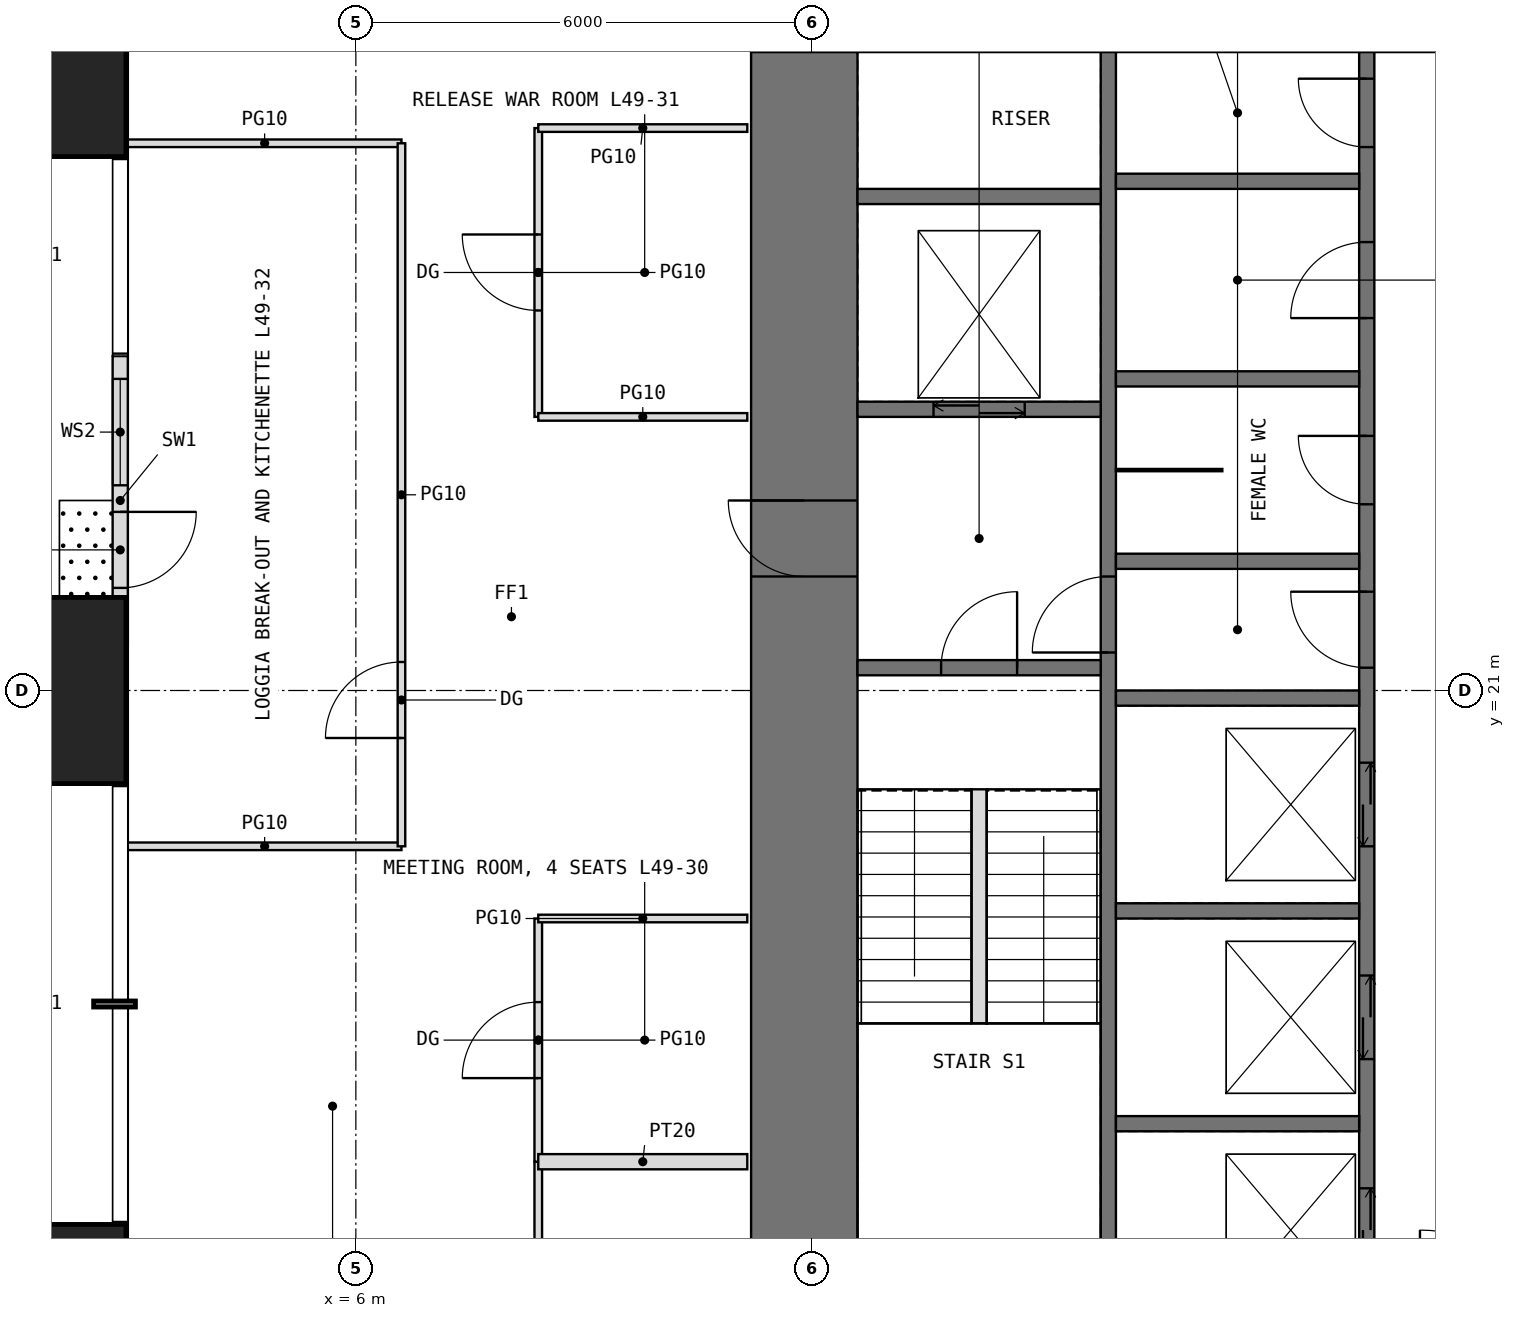
"""IFC4 building model, lengths in metres.
Left out: names, types, materials, properties, quantities, classifications, styles, units other than length and angle.
Written with IfcOpenShell. Run it as: python <this file> out.ifc"""

import sys

from ifc_helpers import new_model, si_unit, direction, frame, frame_2d, origin, origin_2d, place, context, subcontext, project, spatial, rectangle, extrude, element, fill, save


model = new_model("IFC4")
c1 = context("Model", 3, precision=1e-05, world=origin(), true_north=direction((0.0, 1.0)))
c2 = subcontext(c1, "Body", "Model", "MODEL_VIEW")
j1 = project(units=[si_unit("LENGTHUNIT", "METRE"), si_unit("PLANEANGLEUNIT", "RADIAN")], contexts=[c1])
p1 = place(None, origin())
s1 = spatial("IfcSite", under=j1, at=p1, CompositionType="ELEMENT")
p2 = place(p1, origin())
s2 = spatial("IfcBuilding", under=s1, at=p2, CompositionType="ELEMENT")
p3 = place(p2, frame((0.0, 0.0, 206.5)))
s3 = spatial("IfcBuildingStorey", under=s2, at=p3, CompositionType="ELEMENT", Elevation=206.5)
for number, where, z_axis, x_axis in (
    (1, (1.75, 12.75, 0.0), (0.0, 0.0, 1.0), (1.0, 0.0, 0.0)),
    (2, (1.75, 21.0, 0.0), (0.0, 0.0, 1.0), (1.0, 0.0, 0.0)),
    (3, (1.75, 29.25, 0.0), (0.0, 0.0, 1.0), (1.0, 0.0, 0.0)),
):
    element("IfcColumn", number, at=place(p3, frame(where, z_axis=z_axis, x_axis=x_axis)), inside=s3, PredefinedType="COLUMN", context=c2, shape_type="SweptSolid", body=[
        extrude(rectangle(XDim=2.45, YDim=2.45, at=origin_2d()), origin(), (0.0, 0.0, 1.0), 4.0),
    ])
p4 = place(p3, frame((2.9, 25.4, 0.0), z_axis=(0.0, 0.0, 1.0), x_axis=(0.0, -1.0, 0.0)))
e4 = element("IfcWall", 4, at=p4, inside=s3, PredefinedType="USERDEFINED", context=c2, shape_type="SweptSolid", body=[
    extrude(rectangle(XDim=3.8, YDim=0.2, at=frame_2d((1.9, 0.0))), origin(), (0.0, 0.0, 1.0), 3.75),
])
p5 = place(p4, frame((2.05, 0.0, 0.0)))
e5 = element("IfcOpeningElement", 5, at=p5, cuts=e4, PredefinedType="OPENING", context=c2, shape_type="SweptSolid", body=[
    extrude(rectangle(XDim=1.0, YDim=2.4, at=frame_2d((0.5, 1.2))), frame((0.0, 0.11, 0.0), z_axis=(0.0, -1.0, 0.0), x_axis=(1.0, 0.0, 0.0)), (0.0, 0.0, 1.0), 0.22),
])
p6 = place(p4, frame((0.3, 0.0, 0.3)))
e6 = element("IfcOpeningElement", 6, at=p6, cuts=e4, PredefinedType="OPENING", context=c2, shape_type="SweptSolid", body=[
    extrude(rectangle(XDim=1.4, YDim=2.7, at=frame_2d((0.7, 1.35))), frame((0.0, 0.11, 0.0), z_axis=(0.0, -1.0, 0.0), x_axis=(1.0, 0.0, 0.0)), (0.0, 0.0, 1.0), 0.22),
])
p7 = place(p3, frame((11.9, 12.6, -0.05), z_axis=(0.0, 0.0, 1.0), x_axis=(0.0, 1.0, 0.0)))
e7 = element("IfcWall", 7, at=p7, inside=s3, PredefinedType="SHEAR", context=c2, shape_type="SweptSolid", body=[
    extrude(rectangle(XDim=16.8, YDim=1.4, at=frame_2d((8.4, 0.0))), origin(), (0.0, 0.0, 1.0), 4.0),
])
p8 = place(p7, frame((9.9, 0.0, 0.05)))
e8 = element("IfcOpeningElement", 8, at=p8, cuts=e7, PredefinedType="OPENING", context=c2, shape_type="SweptSolid", body=[
    extrude(rectangle(XDim=1.0, YDim=2.2, at=frame_2d((0.5, 1.1))), frame((0.0, 0.71, 0.0), z_axis=(0.0, -1.0, 0.0), x_axis=(1.0, 0.0, 0.0)), (0.0, 0.0, 1.0), 1.42),
])
p9 = place(p3, frame((15.9, 12.6, -0.05), z_axis=(0.0, 0.0, 1.0), x_axis=(0.0, 1.0, 0.0)))
e9 = element("IfcWall", 9, at=p9, inside=s3, PredefinedType="SHEAR", context=c2, shape_type="SweptSolid", body=[
    extrude(rectangle(XDim=16.8, YDim=0.2, at=frame_2d((8.4, 0.0))), origin(), (0.0, 0.0, 1.0), 4.0),
])
p10 = place(p9, frame((8.9, 0.0, 0.05)))
e10 = element("IfcOpeningElement", 10, at=p10, cuts=e9, PredefinedType="OPENING", context=c2, shape_type="SweptSolid", body=[
    extrude(rectangle(XDim=1.0, YDim=2.2, at=frame_2d((0.5, 1.1))), frame((0.0, 0.11, 0.0), z_axis=(0.0, -1.0, 0.0), x_axis=(1.0, 0.0, 0.0)), (0.0, 0.0, 1.0), 0.22),
])
p11 = place(p3, frame((19.3, 12.6, -0.05), z_axis=(0.0, 0.0, 1.0), x_axis=(0.0, 1.0, 0.0)))
e11 = element("IfcWall", 11, at=p11, inside=s3, PredefinedType="SHEAR", context=c2, shape_type="SweptSolid", body=[
    extrude(rectangle(XDim=16.8, YDim=0.2, at=frame_2d((8.4, 0.0))), origin(), (0.0, 0.0, 1.0), 4.0),
])
p12 = place(p11, frame((8.7, 0.0, 0.05)))
e12 = element("IfcOpeningElement", 12, at=p12, cuts=e11, PredefinedType="OPENING", context=c2, shape_type="SweptSolid", body=[
    extrude(rectangle(XDim=1.0, YDim=2.2, at=frame_2d((0.5, 1.1))), frame((0.0, 0.11, 0.0), z_axis=(0.0, -1.0, 0.0), x_axis=(1.0, 0.0, 0.0)), (0.0, 0.0, 1.0), 0.22),
])
p13 = place(p11, frame((10.85, 0.0, 0.05)))
e13 = element("IfcOpeningElement", 13, at=p13, cuts=e11, PredefinedType="OPENING", context=c2, shape_type="SweptSolid", body=[
    extrude(rectangle(XDim=0.9, YDim=2.2, at=frame_2d((0.45, 1.1))), frame((0.0, 0.11, 0.0), z_axis=(0.0, -1.0, 0.0), x_axis=(1.0, 0.0, 0.0)), (0.0, 0.0, 1.0), 0.22),
])
p14 = place(p11, frame((13.3, 0.0, 0.05)))
e14 = element("IfcOpeningElement", 14, at=p14, cuts=e11, PredefinedType="OPENING", context=c2, shape_type="SweptSolid", body=[
    extrude(rectangle(XDim=1.0, YDim=2.2, at=frame_2d((0.5, 1.1))), frame((0.0, 0.11, 0.0), z_axis=(0.0, -1.0, 0.0), x_axis=(1.0, 0.0, 0.0)), (0.0, 0.0, 1.0), 0.22),
])
p15 = place(p11, frame((15.55, 0.0, 0.05)))
e15 = element("IfcOpeningElement", 15, at=p15, cuts=e11, PredefinedType="OPENING", context=c2, shape_type="SweptSolid", body=[
    extrude(rectangle(XDim=0.9, YDim=2.2, at=frame_2d((0.45, 1.1))), frame((0.0, 0.11, 0.0), z_axis=(0.0, -1.0, 0.0), x_axis=(1.0, 0.0, 0.0)), (0.0, 0.0, 1.0), 0.22),
])
p16 = place(p11, frame((0.75, 0.0, 0.05)))
e16 = element("IfcOpeningElement", 16, at=p16, cuts=e11, PredefinedType="OPENING", context=c2, shape_type="SweptSolid", body=[
    extrude(rectangle(XDim=1.1, YDim=2.2, at=frame_2d((0.55, 1.1))), frame((0.0, 0.11, 0.0), z_axis=(0.0, -1.0, 0.0), x_axis=(1.0, 0.0, 0.0)), (0.0, 0.0, 1.0), 0.22),
])
p17 = place(p11, frame((3.55, 0.0, 0.05)))
e17 = element("IfcOpeningElement", 17, at=p17, cuts=e11, PredefinedType="OPENING", context=c2, shape_type="SweptSolid", body=[
    extrude(rectangle(XDim=1.1, YDim=2.2, at=frame_2d((0.55, 1.1))), frame((0.0, 0.11, 0.0), z_axis=(0.0, -1.0, 0.0), x_axis=(1.0, 0.0, 0.0)), (0.0, 0.0, 1.0), 0.22),
])
p18 = place(p11, frame((6.35, 0.0, 0.05)))
e18 = element("IfcOpeningElement", 18, at=p18, cuts=e11, PredefinedType="OPENING", context=c2, shape_type="SweptSolid", body=[
    extrude(rectangle(XDim=1.1, YDim=2.2, at=frame_2d((0.55, 1.1))), frame((0.0, 0.11, 0.0), z_axis=(0.0, -1.0, 0.0), x_axis=(1.0, 0.0, 0.0)), (0.0, 0.0, 1.0), 0.22),
])
p19 = place(p3, frame((12.6, 21.3, -0.05), z_axis=(0.0, 0.0, 1.0), x_axis=(1.0, 0.0, 0.0)))
e19 = element("IfcWall", 19, at=p19, inside=s3, PredefinedType="SHEAR", context=c2, shape_type="SweptSolid", body=[
    extrude(rectangle(XDim=3.2, YDim=0.2, at=frame_2d((1.6, 0.0))), origin(), (0.0, 0.0, 1.0), 4.0),
])
p20 = place(p19, frame((1.1, 0.0, 0.05)))
e20 = element("IfcOpeningElement", 20, at=p20, cuts=e19, PredefinedType="OPENING", context=c2, shape_type="SweptSolid", body=[
    extrude(rectangle(XDim=1.0, YDim=2.2, at=frame_2d((0.5, 1.1))), frame((0.0, 0.11, 0.0), z_axis=(0.0, -1.0, 0.0), x_axis=(1.0, 0.0, 0.0)), (0.0, 0.0, 1.0), 0.22),
])
p21 = place(p3, frame((12.6, 24.7, -0.05), z_axis=(0.0, 0.0, 1.0), x_axis=(1.0, 0.0, 0.0)))
e21 = element("IfcWall", 21, at=p21, inside=s3, PredefinedType="SHEAR", context=c2, shape_type="SweptSolid", body=[
    extrude(rectangle(XDim=3.2, YDim=0.2, at=frame_2d((1.6, 0.0))), origin(), (0.0, 0.0, 1.0), 4.0),
])
p22 = place(p21, frame((1.0, 0.0, 0.05)))
e22 = element("IfcOpeningElement", 22, at=p22, cuts=e21, PredefinedType="OPENING", context=c2, shape_type="SweptSolid", body=[
    extrude(rectangle(XDim=1.2, YDim=2.2, at=frame_2d((0.6, 1.1))), frame((0.0, 0.11, 0.0), z_axis=(0.0, -1.0, 0.0), x_axis=(1.0, 0.0, 0.0)), (0.0, 0.0, 1.0), 0.22),
])
for number, where, z_axis, x_axis in (
    (23, (12.6, 27.5, -0.05), (0.0, 0.0, 1.0), (1.0, 0.0, 0.0)),
    (24, (16.0, 15.3, -0.05), (0.0, 0.0, 1.0), (1.0, 0.0, 0.0)),
    (25, (16.0, 18.1, -0.05), (0.0, 0.0, 1.0), (1.0, 0.0, 0.0)),
    (26, (16.0, 20.9, -0.05), (0.0, 0.0, 1.0), (1.0, 0.0, 0.0)),
    (27, (16.0, 22.7, -0.05), (0.0, 0.0, 1.0), (1.0, 0.0, 0.0)),
    (28, (16.0, 25.1, -0.05), (0.0, 0.0, 1.0), (1.0, 0.0, 0.0)),
    (29, (16.0, 27.7, -0.05), (0.0, 0.0, 1.0), (1.0, 0.0, 0.0)),
):
    element("IfcWall", number, at=place(p3, frame(where, z_axis=z_axis, x_axis=x_axis)), inside=s3, PredefinedType="SHEAR", context=c2, shape_type="SweptSolid", body=[
        extrude(rectangle(XDim=3.2, YDim=0.2, at=frame_2d((1.6, 0.0))), origin(), (0.0, 0.0, 1.0), 4.0),
    ])
p23 = place(p3, frame((16.0, 23.9, 0.0), z_axis=(0.0, 0.0, 1.0), x_axis=(1.0, 0.0, 0.0)))
e30 = element("IfcWall", 30, at=p23, inside=s3, PredefinedType="PARTITIONING", context=c2, shape_type="SweptSolid", body=[
    extrude(rectangle(XDim=1.4, YDim=0.03, at=frame_2d((0.7, 0.0))), origin(), (0.0, 0.0, 1.0), 3.75),
])
for number, where, z_axis, x_axis in (
    (31, (3.0, 18.95, 0.0), (0.0, 0.0, 1.0), (1.0, 0.0, 0.0)),
    (32, (3.0, 28.2, 0.0), (0.0, 0.0, 1.0), (1.0, 0.0, 0.0)),
):
    element("IfcWall", number, at=place(p3, frame(where, z_axis=z_axis, x_axis=x_axis)), inside=s3, PredefinedType="PARTITIONING", context=c2, shape_type="SweptSolid", body=[
        extrude(rectangle(XDim=3.6, YDim=0.1, at=frame_2d((1.8, 0.0))), origin(), (0.0, 0.0, 1.0), 3.75),
    ])
p24 = place(p3, frame((6.6, 18.95, 0.0), z_axis=(0.0, 0.0, 1.0), x_axis=(0.0, 1.0, 0.0)))
e33 = element("IfcWall", 33, at=p24, inside=s3, PredefinedType="PARTITIONING", context=c2, shape_type="SweptSolid", body=[
    extrude(rectangle(XDim=9.25, YDim=0.1, at=frame_2d((4.625, 0.0))), origin(), (0.0, 0.0, 1.0), 3.75),
])
p25 = place(p24, frame((1.425, 0.0, 0.0)))
e34 = element("IfcOpeningElement", 34, at=p25, cuts=e33, PredefinedType="OPENING", context=c2, shape_type="SweptSolid", body=[
    extrude(rectangle(XDim=1.0, YDim=2.4, at=frame_2d((0.5, 1.2))), frame((0.0, 0.06, 0.0), z_axis=(0.0, -1.0, 0.0), x_axis=(1.0, 0.0, 0.0)), (0.0, 0.0, 1.0), 0.12),
])
p26 = place(p3, frame((8.4, 11.2, 0.0), z_axis=(0.0, 0.0, 1.0), x_axis=(0.0, 1.0, 0.0)))
e35 = element("IfcWall", 35, at=p26, inside=s3, PredefinedType="PARTITIONING", context=c2, shape_type="SweptSolid", body=[
    extrude(rectangle(XDim=3.6, YDim=0.1, at=frame_2d((1.8, 0.0))), origin(), (0.0, 0.0, 1.0), 3.75),
])
p27 = place(p26, frame((1.3, 0.0, 0.0)))
e36 = element("IfcOpeningElement", 36, at=p27, cuts=e35, PredefinedType="OPENING", context=c2, shape_type="SweptSolid", body=[
    extrude(rectangle(XDim=1.0, YDim=2.4, at=frame_2d((0.5, 1.2))), frame((0.0, 0.06, 0.0), z_axis=(0.0, -1.0, 0.0), x_axis=(1.0, 0.0, 0.0)), (0.0, 0.0, 1.0), 0.12),
])
p28 = place(p3, frame((8.4, 14.8, 0.0), z_axis=(0.0, 0.0, 1.0), x_axis=(0.0, 1.0, 0.0)))
e37 = element("IfcWall", 37, at=p28, inside=s3, PredefinedType="PARTITIONING", context=c2, shape_type="SweptSolid", body=[
    extrude(rectangle(XDim=3.2, YDim=0.1, at=frame_2d((1.6, 0.0))), origin(), (0.0, 0.0, 1.0), 3.75),
])
p29 = place(p28, frame((1.1, 0.0, 0.0)))
e38 = element("IfcOpeningElement", 38, at=p29, cuts=e37, PredefinedType="OPENING", context=c2, shape_type="SweptSolid", body=[
    extrude(rectangle(XDim=1.0, YDim=2.4, at=frame_2d((0.5, 1.2))), frame((0.0, 0.06, 0.0), z_axis=(0.0, -1.0, 0.0), x_axis=(1.0, 0.0, 0.0)), (0.0, 0.0, 1.0), 0.12),
])
p30 = place(p3, frame((8.4, 14.8, 0.0), z_axis=(0.0, 0.0, 1.0), x_axis=(1.0, 0.0, 0.0)))
e39 = element("IfcWall", 39, at=p30, inside=s3, PredefinedType="PARTITIONING", context=c2, shape_type="SweptSolid", body=[
    extrude(rectangle(XDim=2.75, YDim=0.2, at=frame_2d((1.375, 0.0))), origin(), (0.0, 0.0, 1.0), 3.75),
])
p31 = place(p3, frame((8.4, 18.0, 0.0), z_axis=(0.0, 0.0, 1.0), x_axis=(1.0, 0.0, 0.0)))
e40 = element("IfcWall", 40, at=p31, inside=s3, PredefinedType="PARTITIONING", context=c2, shape_type="SweptSolid", body=[
    extrude(rectangle(XDim=2.75, YDim=0.1, at=frame_2d((1.375, 0.0))), origin(), (0.0, 0.0, 1.0), 3.75),
])
p32 = place(p3, frame((8.4, 24.6, 0.0), z_axis=(0.0, 0.0, 1.0), x_axis=(0.0, 1.0, 0.0)))
e41 = element("IfcWall", 41, at=p32, inside=s3, PredefinedType="PARTITIONING", context=c2, shape_type="SweptSolid", body=[
    extrude(rectangle(XDim=3.8, YDim=0.1, at=frame_2d((1.9, 0.0))), origin(), (0.0, 0.0, 1.0), 3.75),
])
p33 = place(p32, frame((1.4, 0.0, 0.0)))
e42 = element("IfcOpeningElement", 42, at=p33, cuts=e41, PredefinedType="OPENING", context=c2, shape_type="SweptSolid", body=[
    extrude(rectangle(XDim=1.0, YDim=2.4, at=frame_2d((0.5, 1.2))), frame((0.0, 0.06, 0.0), z_axis=(0.0, -1.0, 0.0), x_axis=(1.0, 0.0, 0.0)), (0.0, 0.0, 1.0), 0.12),
])
for number, where, z_axis, x_axis in (
    (43, (8.4, 24.6, 0.0), (0.0, 0.0, 1.0), (1.0, 0.0, 0.0)),
    (44, (8.4, 28.4, 0.0), (0.0, 0.0, 1.0), (1.0, 0.0, 0.0)),
):
    element("IfcWall", number, at=place(p3, frame(where, z_axis=z_axis, x_axis=x_axis)), inside=s3, PredefinedType="PARTITIONING", context=c2, shape_type="SweptSolid", body=[
        extrude(rectangle(XDim=2.75, YDim=0.1, at=frame_2d((1.375, 0.0))), origin(), (0.0, 0.0, 1.0), 3.75),
    ])
p34 = place(p3, frame((14.2, 16.62, 0.0), z_axis=(0.0, 0.0, 1.0), x_axis=(0.0, 1.0, 0.0)))
e45 = element("IfcWall", 45, at=p34, inside=s3, PredefinedType="PARTITIONING", context=c2, shape_type="SweptSolid", body=[
    extrude(rectangle(XDim=3.08, YDim=0.2, at=frame_2d((1.54, 0.0))), origin(), (0.0, 0.0, 1.0), 4.0),
])
p35 = place(p5, origin())
e46 = element("IfcDoor", 46, at=p35, inside=s3, OperationType="SINGLE_SWING_LEFT", PredefinedType="DOOR", context=c2, shape_type="SweptSolid", body=[
    extrude(rectangle(XDim=1.0, YDim=2.4, at=frame_2d((0.5, 1.2))), frame((0.0, 0.025, 0.0), z_axis=(0.0, -1.0, 0.0), x_axis=(1.0, 0.0, 0.0)), (0.0, 0.0, 1.0), 0.05),
])
fill(e5, e46)
p36 = place(p6, origin())
e47 = element("IfcWindow", 47, at=p36, inside=s3, PartitioningType="SINGLE_PANEL", PredefinedType="WINDOW", context=c2, shape_type="SweptSolid", body=[
    extrude(rectangle(XDim=1.4, YDim=2.7, at=frame_2d((0.7, 1.35))), frame((0.0, 0.03, 0.0), z_axis=(0.0, -1.0, 0.0), x_axis=(1.0, 0.0, 0.0)), (0.0, 0.0, 1.0), 0.06),
])
fill(e6, e47)
p37 = place(p8, origin())
e48 = element("IfcDoor", 48, at=p37, inside=s3, OperationType="SINGLE_SWING_RIGHT", PredefinedType="DOOR", context=c2, shape_type="SweptSolid", body=[
    extrude(rectangle(XDim=1.0, YDim=2.2, at=frame_2d((0.5, 1.1))), frame((0.0, 0.025, 0.0), z_axis=(0.0, -1.0, 0.0), x_axis=(1.0, 0.0, 0.0)), (0.0, 0.0, 1.0), 0.05),
])
fill(e8, e48)
p38 = place(p20, origin())
e49 = element("IfcDoor", 49, at=p38, inside=s3, OperationType="SINGLE_SWING_RIGHT", PredefinedType="DOOR", context=c2, shape_type="SweptSolid", body=[
    extrude(rectangle(XDim=1.0, YDim=2.2, at=frame_2d((0.5, 1.1))), frame((0.0, 0.025, 0.0), z_axis=(0.0, -1.0, 0.0), x_axis=(1.0, 0.0, 0.0)), (0.0, 0.0, 1.0), 0.05),
])
fill(e20, e49)
p39 = place(p10, origin())
e50 = element("IfcDoor", 50, at=p39, inside=s3, OperationType="SINGLE_SWING_LEFT", PredefinedType="DOOR", context=c2, shape_type="SweptSolid", body=[
    extrude(rectangle(XDim=1.0, YDim=2.2, at=frame_2d((0.5, 1.1))), frame((0.0, 0.025, 0.0), z_axis=(0.0, -1.0, 0.0), x_axis=(1.0, 0.0, 0.0)), (0.0, 0.0, 1.0), 0.05),
])
fill(e10, e50)
p40 = place(p12, origin())
e51 = element("IfcDoor", 51, at=p40, inside=s3, OperationType="SINGLE_SWING_RIGHT", PredefinedType="DOOR", context=c2, shape_type="SweptSolid", body=[
    extrude(rectangle(XDim=1.0, YDim=2.2, at=frame_2d((0.5, 1.1))), frame((0.0, 0.025, 0.0), z_axis=(0.0, -1.0, 0.0), x_axis=(1.0, 0.0, 0.0)), (0.0, 0.0, 1.0), 0.05),
])
fill(e12, e51)
p41 = place(p13, origin())
e52 = element("IfcDoor", 52, at=p41, inside=s3, OperationType="SINGLE_SWING_RIGHT", PredefinedType="DOOR", context=c2, shape_type="SweptSolid", body=[
    extrude(rectangle(XDim=0.9, YDim=2.2, at=frame_2d((0.45, 1.1))), frame((0.0, 0.025, 0.0), z_axis=(0.0, -1.0, 0.0), x_axis=(1.0, 0.0, 0.0)), (0.0, 0.0, 1.0), 0.05),
])
fill(e13, e52)
p42 = place(p14, origin())
e53 = element("IfcDoor", 53, at=p42, inside=s3, OperationType="SINGLE_SWING_LEFT", PredefinedType="DOOR", context=c2, shape_type="SweptSolid", body=[
    extrude(rectangle(XDim=1.0, YDim=2.2, at=frame_2d((0.5, 1.1))), frame((0.0, 0.025, 0.0), z_axis=(0.0, -1.0, 0.0), x_axis=(1.0, 0.0, 0.0)), (0.0, 0.0, 1.0), 0.05),
])
fill(e14, e53)
p43 = place(p15, origin())
e54 = element("IfcDoor", 54, at=p43, inside=s3, OperationType="SINGLE_SWING_RIGHT", PredefinedType="DOOR", context=c2, shape_type="SweptSolid", body=[
    extrude(rectangle(XDim=0.9, YDim=2.2, at=frame_2d((0.45, 1.1))), frame((0.0, 0.025, 0.0), z_axis=(0.0, -1.0, 0.0), x_axis=(1.0, 0.0, 0.0)), (0.0, 0.0, 1.0), 0.05),
])
fill(e15, e54)
p44 = place(p29, origin())
e55 = element("IfcDoor", 55, at=p44, inside=s3, OperationType="SINGLE_SWING_LEFT", PredefinedType="DOOR", context=c2, shape_type="SweptSolid", body=[
    extrude(rectangle(XDim=1.0, YDim=2.4, at=frame_2d((0.5, 1.2))), frame((0.0, 0.025, 0.0), z_axis=(0.0, -1.0, 0.0), x_axis=(1.0, 0.0, 0.0)), (0.0, 0.0, 1.0), 0.05),
])
fill(e38, e55)
p45 = place(p33, origin())
e56 = element("IfcDoor", 56, at=p45, inside=s3, OperationType="SINGLE_SWING_RIGHT", PredefinedType="DOOR", context=c2, shape_type="SweptSolid", body=[
    extrude(rectangle(XDim=1.0, YDim=2.4, at=frame_2d((0.5, 1.2))), frame((0.0, 0.025, 0.0), z_axis=(0.0, -1.0, 0.0), x_axis=(1.0, 0.0, 0.0)), (0.0, 0.0, 1.0), 0.05),
])
fill(e42, e56)
p46 = place(p25, origin())
e57 = element("IfcDoor", 57, at=p46, inside=s3, OperationType="SINGLE_SWING_LEFT", PredefinedType="DOOR", context=c2, shape_type="SweptSolid", body=[
    extrude(rectangle(XDim=1.0, YDim=2.4, at=frame_2d((0.5, 1.2))), frame((0.0, 0.025, 0.0), z_axis=(0.0, -1.0, 0.0), x_axis=(1.0, 0.0, 0.0)), (0.0, 0.0, 1.0), 0.05),
])
fill(e34, e57)
p47 = place(p16, origin())
e58 = element("IfcDoor", 58, at=p47, inside=s3, OperationType="DOUBLE_DOOR_SLIDING", PredefinedType="DOOR", context=c2, shape_type="SweptSolid", body=[
    extrude(rectangle(XDim=1.1, YDim=2.2, at=frame_2d((0.55, 1.1))), frame((0.0, 0.025, 0.0), z_axis=(0.0, -1.0, 0.0), x_axis=(1.0, 0.0, 0.0)), (0.0, 0.0, 1.0), 0.05),
])
fill(e16, e58)
p48 = place(p17, origin())
e59 = element("IfcDoor", 59, at=p48, inside=s3, OperationType="DOUBLE_DOOR_SLIDING", PredefinedType="DOOR", context=c2, shape_type="SweptSolid", body=[
    extrude(rectangle(XDim=1.1, YDim=2.2, at=frame_2d((0.55, 1.1))), frame((0.0, 0.025, 0.0), z_axis=(0.0, -1.0, 0.0), x_axis=(1.0, 0.0, 0.0)), (0.0, 0.0, 1.0), 0.05),
])
fill(e17, e59)
p49 = place(p18, origin())
e60 = element("IfcDoor", 60, at=p49, inside=s3, OperationType="DOUBLE_DOOR_SLIDING", PredefinedType="DOOR", context=c2, shape_type="SweptSolid", body=[
    extrude(rectangle(XDim=1.1, YDim=2.2, at=frame_2d((0.55, 1.1))), frame((0.0, 0.025, 0.0), z_axis=(0.0, -1.0, 0.0), x_axis=(1.0, 0.0, 0.0)), (0.0, 0.0, 1.0), 0.05),
])
fill(e18, e60)
p50 = place(p22, origin())
e61 = element("IfcDoor", 61, at=p50, inside=s3, OperationType="DOUBLE_DOOR_SLIDING", PredefinedType="DOOR", context=c2, shape_type="SweptSolid", body=[
    extrude(rectangle(XDim=1.2, YDim=2.2, at=frame_2d((0.6, 1.1))), frame((0.0, 0.025, 0.0), z_axis=(0.0, -1.0, 0.0), x_axis=(1.0, 0.0, 0.0)), (0.0, 0.0, 1.0), 0.05),
])
fill(e22, e61)
save(model, sys.argv[1])
